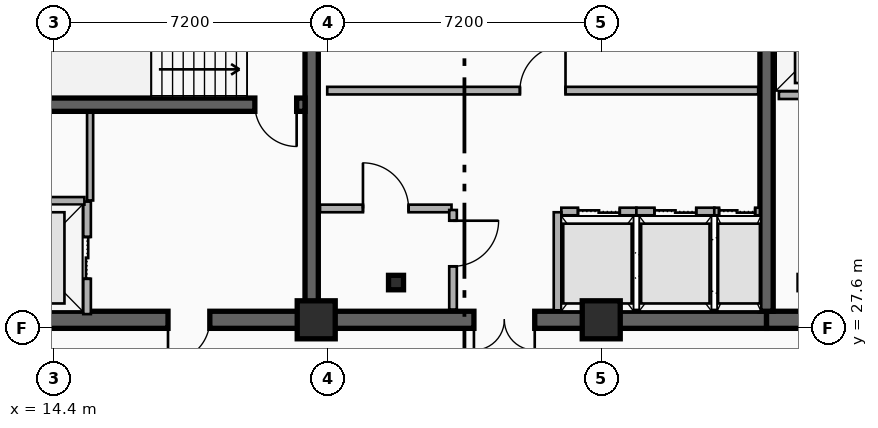
"""IFC4 building model, lengths in metres.
Left out: names, types, materials, properties, quantities, classifications, styles, units other than length and angle.
Written with IfcOpenShell. Run it as: python <this file> out.ifc"""

import sys

from ifc_helpers import new_model, si_unit, direction, frame, frame_2d, origin, origin_2d, place, context, subcontext, project, spatial, rectangle, i_section, extrude, element, fill, save


model = new_model("IFC4")
c1 = context("Model", 3, precision=1e-05, world=origin(), true_north=direction((0.0, 1.0)))
c2 = subcontext(c1, "Body", "Model", "MODEL_VIEW")
j1 = project(units=[si_unit("LENGTHUNIT", "METRE"), si_unit("PLANEANGLEUNIT", "RADIAN")], contexts=[c1])
p1 = place(None, origin())
s1 = spatial("IfcSite", under=j1, at=p1, CompositionType="ELEMENT")
p2 = place(p1, origin())
s2 = spatial("IfcBuilding", under=s1, at=p2, CompositionType="ELEMENT")
p3 = place(p2, frame((0.0, 0.0, 236.4)))
s3 = spatial("IfcBuildingStorey", under=s2, at=p3, CompositionType="ELEMENT", Elevation=236.4)
p4 = place(p3, frame((21.18, 27.82, 0.0), z_axis=(0.0, 0.0, 1.0), x_axis=(-1.0, 0.0, 0.0)))
e1 = element("IfcWall", 1, at=p4, inside=s3, PredefinedType="SHEAR", context=c2, shape_type="SweptSolid", body=[
    extrude(rectangle(XDim=9.03, YDim=0.45, at=frame_2d((4.515, 0.0))), origin(), (0.0, 0.0, 1.0), 3.6),
])
p5 = place(p4, frame((2.68, 0.0, 0.0)))
e2 = element("IfcOpeningElement", 2, at=p5, cuts=e1, PredefinedType="OPENING", context=c2, shape_type="SweptSolid", body=[
    extrude(rectangle(XDim=1.1, YDim=2.15, at=frame_2d((0.55, 1.075))), frame((0.0, 0.235, 0.0), z_axis=(0.0, -1.0, 0.0), x_axis=(1.0, 0.0, 0.0)), (0.0, 0.0, 1.0), 0.47),
])
p6 = place(p3, frame((33.15, 27.82, 0.0), z_axis=(0.0, 0.0, 1.0), x_axis=(-1.0, 0.0, 0.0)))
e3 = element("IfcWall", 3, at=p6, inside=s3, PredefinedType="SHEAR", context=c2, shape_type="SweptSolid", body=[
    extrude(rectangle(XDim=11.97, YDim=0.45, at=frame_2d((5.985, 0.0))), origin(), (0.0, 0.0, 1.0), 3.6),
])
p7 = place(p6, frame((6.1, 0.0, 0.0)))
e4 = element("IfcOpeningElement", 4, at=p7, cuts=e3, PredefinedType="OPENING", context=c2, shape_type="SweptSolid", body=[
    extrude(rectangle(XDim=1.6, YDim=2.2, at=frame_2d((0.8, 1.1))), frame((0.0, 0.235, 0.0), z_axis=(0.0, -1.0, 0.0), x_axis=(1.0, 0.0, 0.0)), (0.0, 0.0, 1.0), 0.47),
])
p8 = place(p3, frame((45.38, 27.82, 0.0), z_axis=(0.0, 0.0, 1.0), x_axis=(-1.0, 0.0, 0.0)))
e5 = element("IfcWall", 5, at=p8, inside=s3, PredefinedType="SHEAR", context=c2, shape_type="SweptSolid", body=[
    extrude(rectangle(XDim=12.23, YDim=0.45, at=frame_2d((6.115, 0.0))), origin(), (0.0, 0.0, 1.0), 3.6),
])
p9 = place(p8, frame((9.93, 0.0, 0.0)))
e6 = element("IfcOpeningElement", 6, at=p9, cuts=e5, PredefinedType="OPENING", context=c2, shape_type="SweptSolid", body=[
    extrude(rectangle(XDim=1.1, YDim=2.15, at=frame_2d((0.55, 1.075))), frame((0.0, 0.235, 0.0), z_axis=(0.0, -1.0, 0.0), x_axis=(1.0, 0.0, 0.0)), (0.0, 0.0, 1.0), 0.47),
])
p10 = place(p8, frame((6.23, 0.0, 0.0)))
e7 = element("IfcOpeningElement", 7, at=p10, cuts=e5, PredefinedType="OPENING", context=c2, shape_type="SweptSolid", body=[
    extrude(rectangle(XDim=1.1, YDim=2.15, at=frame_2d((0.55, 1.075))), frame((0.0, 0.235, 0.0), z_axis=(0.0, -1.0, 0.0), x_axis=(1.0, 0.0, 0.0)), (0.0, 0.0, 1.0), 0.47),
])
for number, where, z_axis, x_axis in (
    (8, (21.18, 28.045, 0.0), (0.0, 0.0, 1.0), (0.0, 1.0, 0.0)),
    (9, (33.15, 28.045, 0.0), (0.0, 0.0, 1.0), (0.0, 1.0, 0.0)),
):
    element("IfcWall", number, at=place(p3, frame(where, z_axis=z_axis, x_axis=x_axis)), inside=s3, PredefinedType="SHEAR", context=c2, shape_type="SweptSolid", body=[
        extrude(rectangle(XDim=8.78, YDim=0.35, at=frame_2d((4.39, 0.0))), origin(), (0.0, 0.0, 1.0), 3.6),
    ])
p11 = place(p3, frame((21.005, 33.48, 0.0), z_axis=(0.0, 0.0, 1.0), x_axis=(-1.0, 0.0, 0.0)))
e10 = element("IfcWall", 10, at=p11, inside=s3, PredefinedType="SHEAR", context=c2, shape_type="SweptSolid", body=[
    extrude(rectangle(XDim=8.63, YDim=0.35, at=frame_2d((4.315, 0.0))), origin(), (0.0, 0.0, 1.0), 3.6),
])
p12 = place(p11, frame((0.22, 0.0, 0.0)))
e11 = element("IfcOpeningElement", 11, at=p12, cuts=e10, PredefinedType="OPENING", context=c2, shape_type="SweptSolid", body=[
    extrude(rectangle(XDim=1.1, YDim=2.15, at=frame_2d((0.55, 1.075))), frame((0.0, 0.185, 0.0), z_axis=(0.0, -1.0, 0.0), x_axis=(1.0, 0.0, 0.0)), (0.0, 0.0, 1.0), 0.37),
])
p13 = place(p3, frame((23.4, 28.8, 0.0), z_axis=(0.0, 0.0, 1.0), x_axis=(1.0, 0.0, 0.0)))
e12 = element("IfcColumn", 12, at=p13, inside=s3, PredefinedType="COLUMN", context=c2, shape_type="SweptSolid", body=[
    extrude(i_section(OverallWidth=0.395, OverallDepth=0.38, WebThickness=0.019, FlangeThickness=0.03, FilletRadius=0.015, at=origin_2d()), origin(), (0.0, 0.0, 1.0), 3.6),
])
for number, where, z_axis, x_axis in (
    (13, (21.3, 27.82, 0.0), (0.0, 0.0, 1.0), (1.0, 0.0, 0.0)),
    (14, (28.8, 27.82, 0.0), (0.0, 0.0, 1.0), (1.0, 0.0, 0.0)),
):
    element("IfcColumn", number, at=place(p3, frame(where, z_axis=z_axis, x_axis=x_axis)), inside=s3, PredefinedType="COLUMN", context=c2, shape_type="SweptSolid", body=[
        extrude(rectangle(XDim=1.0, YDim=1.0, at=origin_2d()), origin(), (0.0, 0.0, 1.0), 3.6),
    ])
p14 = place(p3, frame((15.27, 27.97, 0.0), z_axis=(0.0, 0.0, 1.0), x_axis=(0.0, 1.0, 0.0)))
e15 = element("IfcWall", 15, at=p14, inside=s3, PredefinedType="PARTITIONING", context=c2, shape_type="SweptSolid", body=[
    extrude(rectangle(XDim=2.96, YDim=0.2, at=frame_2d((1.48, 0.0))), origin(), (0.0, 0.0, 1.0), 2.41),
])
p15 = place(p14, frame((0.93, 0.0, 0.0)))
e16 = element("IfcOpeningElement", 16, at=p15, cuts=e15, PredefinedType="OPENING", context=c2, shape_type="SweptSolid", body=[
    extrude(rectangle(XDim=1.1, YDim=2.15, at=frame_2d((0.55, 1.075))), frame((0.0, 0.11, 0.0), z_axis=(0.0, -1.0, 0.0), x_axis=(1.0, 0.0, 0.0)), (0.0, 0.0, 1.0), 0.22),
])
p16 = place(p3, frame((12.45, 30.95, 0.0), z_axis=(0.0, 0.0, 1.0), x_axis=(1.0, 0.0, 0.0)))
e17 = element("IfcWall", 17, at=p16, inside=s3, PredefinedType="PARTITIONING", context=c2, shape_type="SweptSolid", body=[
    extrude(rectangle(XDim=2.75, YDim=0.2, at=frame_2d((1.375, 0.0))), origin(), (0.0, 0.0, 1.0), 2.41),
])
p17 = place(p3, frame((33.475, 33.73, 0.0), z_axis=(0.0, 0.0, 1.0), x_axis=(1.0, 0.0, 0.0)))
e18 = element("IfcWall", 18, at=p17, inside=s3, PredefinedType="PARTITIONING", context=c2, shape_type="SweptSolid", body=[
    extrude(rectangle(XDim=2.725, YDim=0.2, at=frame_2d((1.362, 0.0))), origin(), (0.0, 0.0, 1.0), 2.41),
])
p18 = place(p17, frame((0.812, 0.0, 0.0)))
e19 = element("IfcOpeningElement", 19, at=p18, cuts=e18, PredefinedType="OPENING", context=c2, shape_type="SweptSolid", body=[
    extrude(rectangle(XDim=1.1, YDim=2.15, at=frame_2d((0.55, 1.075))), frame((0.0, 0.11, 0.0), z_axis=(0.0, -1.0, 0.0), x_axis=(1.0, 0.0, 0.0)), (0.0, 0.0, 1.0), 0.22),
])
p19 = place(p3, frame((27.75, 30.67, 0.0), z_axis=(0.0, 0.0, 1.0), x_axis=(1.0, 0.0, 0.0)))
e20 = element("IfcWall", 20, at=p19, inside=s3, PredefinedType="PARTITIONING", context=c2, shape_type="SweptSolid", body=[
    extrude(rectangle(XDim=1.975, YDim=0.2, at=frame_2d((0.988, 0.0))), origin(), (0.0, 0.0, 1.0), 2.41),
])
p20 = place(p19, frame((0.438, 0.0, 0.0)))
e21 = element("IfcOpeningElement", 21, at=p20, cuts=e20, PredefinedType="OPENING", context=c2, shape_type="SweptSolid", body=[
    extrude(rectangle(XDim=1.1, YDim=2.15, at=frame_2d((0.55, 1.075))), frame((0.0, 0.11, 0.0), z_axis=(0.0, -1.0, 0.0), x_axis=(1.0, 0.0, 0.0)), (0.0, 0.0, 1.0), 0.22),
])
p21 = place(p3, frame((27.65, 28.07, 0.0), z_axis=(0.0, 0.0, 1.0), x_axis=(0.0, 1.0, 0.0)))
e22 = element("IfcWall", 22, at=p21, inside=s3, PredefinedType="PARTITIONING", context=c2, shape_type="SweptSolid", body=[
    extrude(rectangle(XDim=2.58, YDim=0.2, at=frame_2d((1.29, 0.0))), origin(), (0.0, 0.0, 1.0), 2.41),
])
p22 = place(p3, frame((29.725, 30.67, 0.0), z_axis=(0.0, 0.0, 1.0), x_axis=(1.0, 0.0, 0.0)))
e23 = element("IfcWall", 23, at=p22, inside=s3, PredefinedType="PARTITIONING", context=c2, shape_type="SweptSolid", body=[
    extrude(rectangle(XDim=2.05, YDim=0.2, at=frame_2d((1.025, 0.0))), origin(), (0.0, 0.0, 1.0), 2.72),
])
p23 = place(p22, frame((0.475, 0.0, 0.0)))
e24 = element("IfcOpeningElement", 24, at=p23, cuts=e23, PredefinedType="OPENING", context=c2, shape_type="SweptSolid", body=[
    extrude(rectangle(XDim=1.1, YDim=2.15, at=frame_2d((0.55, 1.075))), frame((0.0, 0.11, 0.0), z_axis=(0.0, -1.0, 0.0), x_axis=(1.0, 0.0, 0.0)), (0.0, 0.0, 1.0), 0.22),
])
p24 = place(p3, frame((31.775, 30.67, 0.0), z_axis=(0.0, 0.0, 1.0), x_axis=(1.0, 0.0, 0.0)))
e25 = element("IfcWall", 25, at=p24, inside=s3, PredefinedType="PARTITIONING", context=c2, shape_type="SweptSolid", body=[
    extrude(rectangle(XDim=1.2, YDim=0.2, at=frame_2d((0.6, 0.0))), origin(), (0.0, 0.0, 1.0), 2.72),
])
p25 = place(p24, frame((0.125, 0.0, 0.0)))
e26 = element("IfcOpeningElement", 26, at=p25, cuts=e25, PredefinedType="OPENING", context=c2, shape_type="SweptSolid", body=[
    extrude(rectangle(XDim=0.95, YDim=2.15, at=frame_2d((0.475, 1.075))), frame((0.0, 0.11, 0.0), z_axis=(0.0, -1.0, 0.0), x_axis=(1.0, 0.0, 0.0)), (0.0, 0.0, 1.0), 0.22),
])
p26 = place(p3, frame((21.4, 30.75, 0.0), z_axis=(0.0, 0.0, 1.0), x_axis=(1.0, 0.0, 0.0)))
e27 = element("IfcWall", 27, at=p26, inside=s3, PredefinedType="PARTITIONING", context=c2, shape_type="SweptSolid", body=[
    extrude(rectangle(XDim=3.46, YDim=0.2, at=frame_2d((1.73, 0.0))), origin(), (0.0, 0.0, 1.0), 2.41),
])
p27 = place(p26, frame((1.13, 0.0, 0.0)))
e28 = element("IfcOpeningElement", 28, at=p27, cuts=e27, PredefinedType="OPENING", context=c2, shape_type="SweptSolid", body=[
    extrude(rectangle(XDim=1.2, YDim=2.15, at=frame_2d((0.6, 1.075))), frame((0.0, 0.11, 0.0), z_axis=(0.0, -1.0, 0.0), x_axis=(1.0, 0.0, 0.0)), (0.0, 0.0, 1.0), 0.22),
])
p28 = place(p3, frame((21.59, 33.85, 0.0), z_axis=(0.0, 0.0, 1.0), x_axis=(1.0, 0.0, 0.0)))
e29 = element("IfcWall", 29, at=p28, inside=s3, PredefinedType="PARTITIONING", context=c2, shape_type="SweptSolid", body=[
    extrude(rectangle(XDim=11.34, YDim=0.2, at=frame_2d((5.67, 0.0))), origin(), (0.0, 0.0, 1.0), 2.41),
])
p29 = place(p28, frame((5.07, 0.0, 0.0)))
e30 = element("IfcOpeningElement", 30, at=p29, cuts=e29, PredefinedType="OPENING", context=c2, shape_type="SweptSolid", body=[
    extrude(rectangle(XDim=1.2, YDim=2.15, at=frame_2d((0.6, 1.075))), frame((0.0, 0.11, 0.0), z_axis=(0.0, -1.0, 0.0), x_axis=(1.0, 0.0, 0.0)), (0.0, 0.0, 1.0), 0.22),
])
p30 = place(p3, frame((24.9, 30.71, 0.0), z_axis=(0.0, 0.0, 1.0), x_axis=(0.0, -1.0, 0.0)))
e31 = element("IfcWall", 31, at=p30, inside=s3, PredefinedType="PARTITIONING", context=c2, shape_type="SweptSolid", body=[
    extrude(rectangle(XDim=2.62, YDim=0.2, at=frame_2d((1.31, 0.0))), origin(), (0.0, 0.0, 1.0), 2.72),
])
p31 = place(p30, frame((0.282, 0.0, 0.0)))
e32 = element("IfcOpeningElement", 32, at=p31, cuts=e31, PredefinedType="OPENING", context=c2, shape_type="SweptSolid", body=[
    extrude(rectangle(XDim=1.2, YDim=2.15, at=frame_2d((0.6, 1.075))), frame((0.0, 0.11, 0.0), z_axis=(0.0, -1.0, 0.0), x_axis=(1.0, 0.0, 0.0)), (0.0, 0.0, 1.0), 0.22),
])
p32 = place(p3, frame((15.35, 30.96, 0.0), z_axis=(0.0, 0.0, 1.0), x_axis=(0.0, 1.0, 0.0)))
e33 = element("IfcWall", 33, at=p32, inside=s3, PredefinedType="PARTITIONING", context=c2, shape_type="SweptSolid", body=[
    extrude(rectangle(XDim=2.31, YDim=0.16, at=frame_2d((1.155, 0.0))), origin(), (0.0, 0.0, 1.0), 3.34),
])
p33 = place(p15, origin())
e34 = element("IfcDoor", 34, at=p33, inside=s3, OperationType="DOUBLE_DOOR_SLIDING", PredefinedType="DOOR", context=c2, shape_type="SweptSolid", body=[
    extrude(rectangle(XDim=1.1, YDim=2.15, at=frame_2d((0.55, 1.075))), frame((0.0, 0.025, 0.0), z_axis=(0.0, -1.0, 0.0), x_axis=(1.0, 0.0, 0.0)), (0.0, 0.0, 1.0), 0.05),
])
fill(e16, e34)
p34 = place(p20, origin())
e35 = element("IfcDoor", 35, at=p34, inside=s3, OperationType="DOUBLE_DOOR_SLIDING", PredefinedType="DOOR", context=c2, shape_type="SweptSolid", body=[
    extrude(rectangle(XDim=1.1, YDim=2.15, at=frame_2d((0.55, 1.075))), frame((0.0, 0.025, 0.0), z_axis=(0.0, -1.0, 0.0), x_axis=(1.0, 0.0, 0.0)), (0.0, 0.0, 1.0), 0.05),
])
fill(e21, e35)
p35 = place(p23, origin())
e36 = element("IfcDoor", 36, at=p35, inside=s3, OperationType="DOUBLE_DOOR_SLIDING", PredefinedType="DOOR", context=c2, shape_type="SweptSolid", body=[
    extrude(rectangle(XDim=1.1, YDim=2.15, at=frame_2d((0.55, 1.075))), frame((0.0, 0.025, 0.0), z_axis=(0.0, -1.0, 0.0), x_axis=(1.0, 0.0, 0.0)), (0.0, 0.0, 1.0), 0.05),
])
fill(e24, e36)
p36 = place(p25, origin())
e37 = element("IfcDoor", 37, at=p36, inside=s3, OperationType="DOUBLE_DOOR_SLIDING", PredefinedType="DOOR", context=c2, shape_type="SweptSolid", body=[
    extrude(rectangle(XDim=0.95, YDim=2.15, at=frame_2d((0.475, 1.075))), frame((0.0, 0.025, 0.0), z_axis=(0.0, -1.0, 0.0), x_axis=(1.0, 0.0, 0.0)), (0.0, 0.0, 1.0), 0.05),
])
fill(e26, e37)
p37 = place(p12, origin())
e38 = element("IfcDoor", 38, at=p37, inside=s3, OperationType="SINGLE_SWING_LEFT", PredefinedType="DOOR", context=c2, shape_type="SweptSolid", body=[
    extrude(rectangle(XDim=1.1, YDim=2.15, at=frame_2d((0.55, 1.075))), frame((0.0, 0.025, 0.0), z_axis=(0.0, -1.0, 0.0), x_axis=(1.0, 0.0, 0.0)), (0.0, 0.0, 1.0), 0.05),
])
fill(e11, e38)
p38 = place(p5, origin())
e39 = element("IfcDoor", 39, at=p38, inside=s3, OperationType="SINGLE_SWING_RIGHT", PredefinedType="DOOR", context=c2, shape_type="SweptSolid", body=[
    extrude(rectangle(XDim=1.1, YDim=2.15, at=frame_2d((0.55, 1.075))), frame((0.0, 0.025, 0.0), z_axis=(0.0, -1.0, 0.0), x_axis=(1.0, 0.0, 0.0)), (0.0, 0.0, 1.0), 0.05),
])
fill(e2, e39)
p39 = place(p7, origin())
e40 = element("IfcDoor", 40, at=p39, inside=s3, OperationType="SINGLE_SWING_LEFT", PredefinedType="DOOR", context=c2, shape_type="SweptSolid", body=[
    extrude(rectangle(XDim=1.6, YDim=2.2, at=frame_2d((0.8, 1.1))), frame((0.0, 0.025, 0.0), z_axis=(0.0, -1.0, 0.0), x_axis=(1.0, 0.0, 0.0)), (0.0, 0.0, 1.0), 0.05),
])
fill(e4, e40)
p40 = place(p27, origin())
e41 = element("IfcDoor", 41, at=p40, inside=s3, OperationType="SINGLE_SWING_LEFT", PredefinedType="DOOR", context=c2, shape_type="SweptSolid", body=[
    extrude(rectangle(XDim=1.2, YDim=2.15, at=frame_2d((0.6, 1.075))), frame((0.0, 0.025, 0.0), z_axis=(0.0, -1.0, 0.0), x_axis=(1.0, 0.0, 0.0)), (0.0, 0.0, 1.0), 0.05),
])
fill(e28, e41)
p41 = place(p29, origin())
e42 = element("IfcDoor", 42, at=p41, inside=s3, OperationType="SINGLE_SWING_RIGHT", PredefinedType="DOOR", context=c2, shape_type="SweptSolid", body=[
    extrude(rectangle(XDim=1.2, YDim=2.15, at=frame_2d((0.6, 1.075))), frame((0.0, 0.025, 0.0), z_axis=(0.0, -1.0, 0.0), x_axis=(1.0, 0.0, 0.0)), (0.0, 0.0, 1.0), 0.05),
])
fill(e30, e42)
p42 = place(p31, origin())
e43 = element("IfcDoor", 43, at=p42, inside=s3, OperationType="SINGLE_SWING_LEFT", PredefinedType="DOOR", context=c2, shape_type="SweptSolid", body=[
    extrude(rectangle(XDim=1.2, YDim=2.15, at=frame_2d((0.6, 1.075))), frame((0.0, 0.025, 0.0), z_axis=(0.0, -1.0, 0.0), x_axis=(1.0, 0.0, 0.0)), (0.0, 0.0, 1.0), 0.05),
])
fill(e32, e43)
save(model, sys.argv[1])
